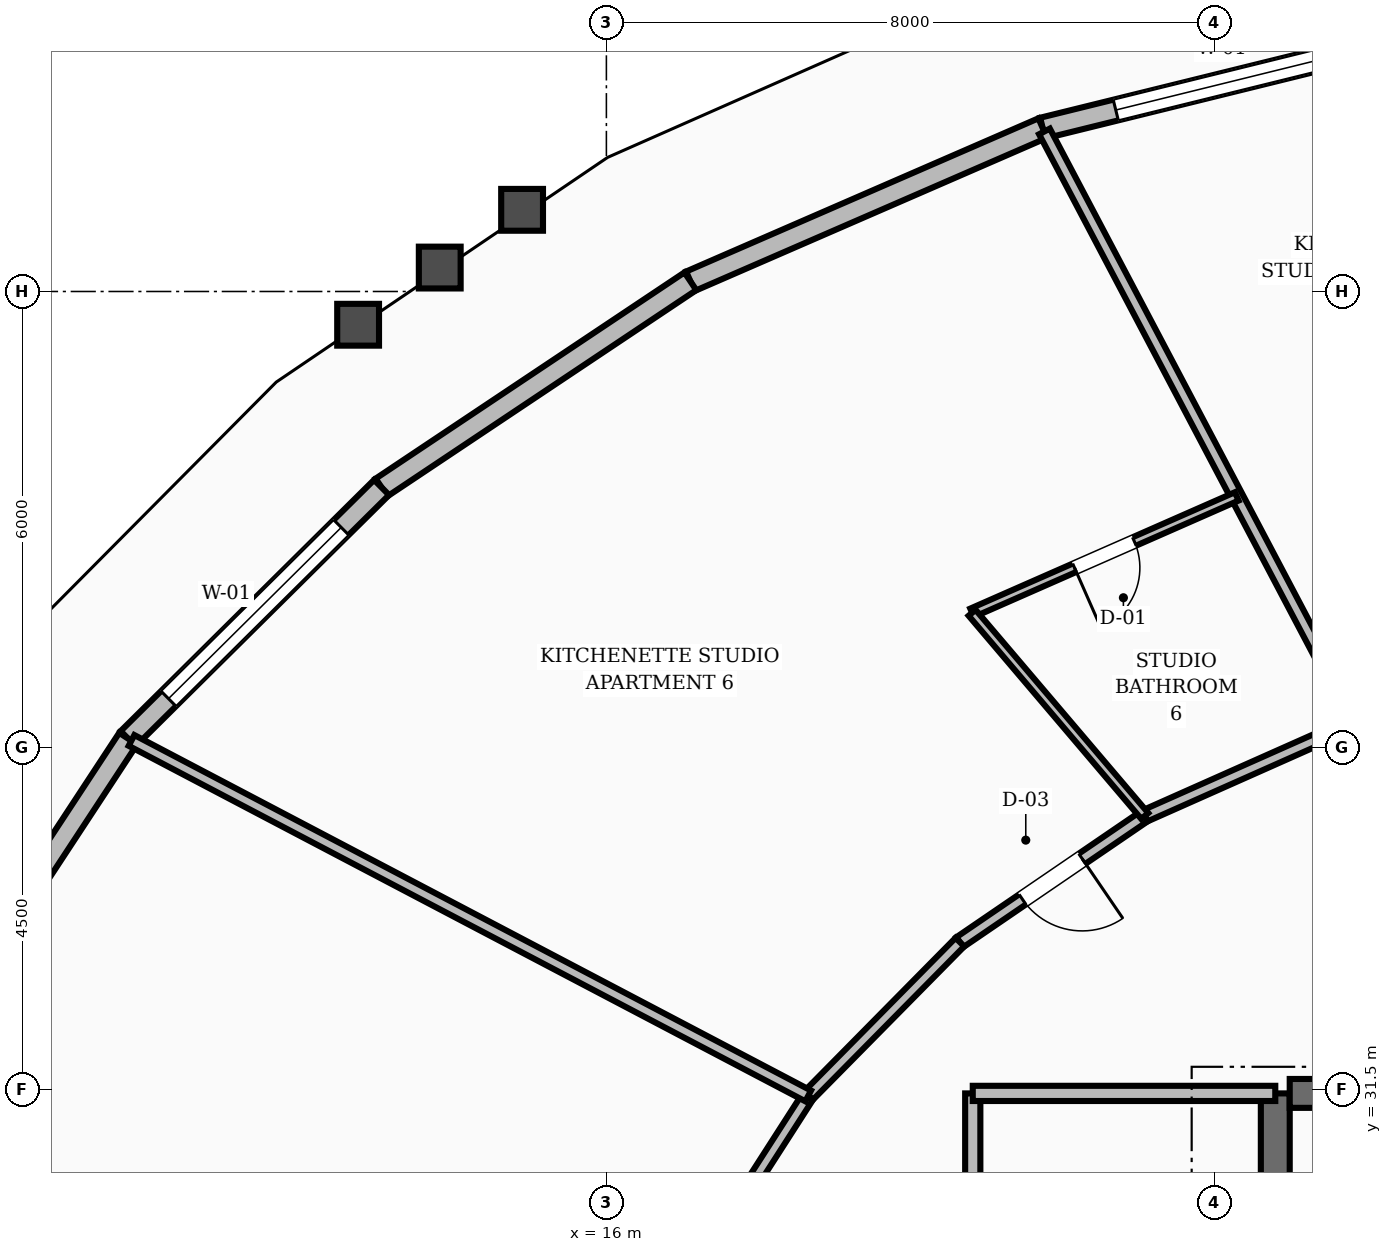
"""IFC4 building model, lengths in metres.
Left out: names, types, materials, properties, quantities, classifications, styles, units other than length and angle.
Written with IfcOpenShell. Run it as: python <this file> out.ifc"""

import sys

from ifc_helpers import new_model, si_unit, direction, frame, frame_2d, origin, place, context, subcontext, project, spatial, rectangle, extrude, element, fill, save


model = new_model("IFC4")
c1 = context("Model", 3, precision=1e-05, world=origin(), true_north=direction((0.0, 1.0)))
c2 = subcontext(c1, "Body", "Model", "MODEL_VIEW")
j1 = project(units=[si_unit("LENGTHUNIT", "METRE"), si_unit("PLANEANGLEUNIT", "RADIAN")], contexts=[c1])
p1 = place(None, origin())
s1 = spatial("IfcSite", under=j1, at=p1, CompositionType="ELEMENT")
p2 = place(p1, origin())
s2 = spatial("IfcBuilding", under=s1, at=p2, CompositionType="ELEMENT")
p3 = place(p2, frame((0.0, 0.0, 62.8)))
s3 = spatial("IfcBuildingStorey", under=s2, at=p3, CompositionType="ELEMENT", Elevation=62.8)
p4 = place(p3, frame((24.8, 25.15, 0.0), z_axis=(0.0, 0.0, 1.0), x_axis=(0.0, 1.0, 0.0)))
e1 = element("IfcWall", 1, at=p4, inside=s3, PredefinedType="SHEAR", context=c2, shape_type="SweptSolid", body=[
    extrude(rectangle(XDim=6.3, YDim=0.38, at=frame_2d((3.15, 0.0))), origin(), (0.0, 0.0, 1.0), 3.6),
])
p5 = place(p3, frame((24.99, 31.45, 0.0), z_axis=(0.0, 0.0, 1.0), x_axis=(1.0, 0.0, 0.0)))
e2 = element("IfcWall", 2, at=p5, inside=s3, PredefinedType="SHEAR", context=c2, shape_type="SweptSolid", body=[
    extrude(rectangle(XDim=3.21, YDim=0.38, at=frame_2d((1.605, 0.0))), origin(), (0.0, 0.0, 1.0), 3.6),
])
p6 = place(p3, frame((26.77, 45.391, 0.0), z_axis=(0.0, 0.0, 1.0), x_axis=(-0.970869978012, -0.239606940205, 0.0)))
e3 = element("IfcWall", 3, at=p6, inside=s3, PredefinedType="STANDARD", context=c2, shape_type="SweptSolid", body=[
    extrude(rectangle(XDim=5.18, YDim=0.28, at=frame_2d((2.59, 0.0))), origin(), (0.0, 0.0, 1.0), 2.71),
])
p7 = place(p6, frame((0.99, 0.0, 0.8)))
e4 = element("IfcOpeningElement", 4, at=p7, cuts=e3, PredefinedType="OPENING", context=c2, shape_type="SweptSolid", body=[
    extrude(rectangle(XDim=3.2, YDim=1.65, at=frame_2d((1.6, 0.825))), frame((0.0, 0.15, 0.0), z_axis=(0.0, -1.0, 0.0), x_axis=(1.0, 0.0, 0.0)), (0.0, 0.0, 1.0), 0.3),
])
p8 = place(p3, frame((21.74, 44.15, 0.0), z_axis=(0.0, 0.0, 1.0), x_axis=(-0.917066216605, -0.398734942488, 0.0)))
e5 = element("IfcWall", 5, at=p8, inside=s3, PredefinedType="STANDARD", context=c2, shape_type="SweptSolid", body=[
    extrude(rectangle(XDim=5.054, YDim=0.28, at=frame_2d((2.527, 0.0))), origin(), (0.0, 0.0, 1.0), 2.71),
])
p9 = place(p3, frame((17.105, 42.135, 0.0), z_axis=(0.0, 0.0, 1.0), x_axis=(-0.831665633672, -0.555276754213, 0.0)))
e6 = element("IfcWall", 6, at=p9, inside=s3, PredefinedType="STANDARD", context=c2, shape_type="SweptSolid", body=[
    extrude(rectangle(XDim=4.885, YDim=0.28, at=frame_2d((2.442, 0.0))), origin(), (0.0, 0.0, 1.0), 2.71),
])
p10 = place(p3, frame((13.042, 39.422, 0.0), z_axis=(0.0, 0.0, 1.0), x_axis=(-0.710194142887, -0.704005880238, 0.0)))
e7 = element("IfcWall", 7, at=p10, inside=s3, PredefinedType="STANDARD", context=c2, shape_type="SweptSolid", body=[
    extrude(rectangle(XDim=4.695, YDim=0.28, at=frame_2d((2.347, 0.0))), origin(), (0.0, 0.0, 1.0), 2.71),
])
p11 = place(p10, frame((0.747, 0.0, 0.8)))
e8 = element("IfcOpeningElement", 8, at=p11, cuts=e7, PredefinedType="OPENING", context=c2, shape_type="SweptSolid", body=[
    extrude(rectangle(XDim=3.2, YDim=1.65, at=frame_2d((1.6, 0.825))), frame((0.0, 0.15, 0.0), z_axis=(0.0, -1.0, 0.0), x_axis=(1.0, 0.0, 0.0)), (0.0, 0.0, 1.0), 0.3),
])
p12 = place(p3, frame((9.708, 36.117, 0.0), z_axis=(0.0, 0.0, 1.0), x_axis=(-0.54914333256, -0.835728185659, 0.0)))
e9 = element("IfcWall", 9, at=p12, inside=s3, PredefinedType="STANDARD", context=c2, shape_type="SweptSolid", body=[
    extrude(rectangle(XDim=4.512, YDim=0.28, at=frame_2d((2.256, 0.0))), origin(), (0.0, 0.0, 1.0), 2.71),
])
p13 = place(p3, frame((20.82, 28.32, 0.0), z_axis=(0.0, 0.0, 1.0), x_axis=(0.0, 1.0, 0.0)))
e10 = element("IfcWall", 10, at=p13, inside=s3, PredefinedType="SOLIDWALL", context=c2, shape_type="SweptSolid", body=[
    extrude(rectangle(XDim=3.13, YDim=0.2, at=frame_2d((1.565, 0.0))), origin(), (0.0, 0.0, 1.0), 2.71),
])
p14 = place(p13, frame((1.09, 0.0, 0.0)))
e11 = element("IfcOpeningElement", 11, at=p14, cuts=e10, PredefinedType="OPENING", context=c2, shape_type="SweptSolid", body=[
    extrude(rectangle(XDim=0.95, YDim=2.1, at=frame_2d((0.475, 1.05))), frame((0.0, 0.11, 0.0), z_axis=(0.0, -1.0, 0.0), x_axis=(1.0, 0.0, 0.0)), (0.0, 0.0, 1.0), 0.22),
])
p15 = place(p3, frame((20.82, 31.45, 0.0), z_axis=(0.0, 0.0, 1.0), x_axis=(1.0, 0.0, 0.0)))
e12 = element("IfcWall", 12, at=p15, inside=s3, PredefinedType="SOLIDWALL", context=c2, shape_type="SweptSolid", body=[
    extrude(rectangle(XDim=3.98, YDim=0.2, at=frame_2d((1.99, 0.0))), origin(), (0.0, 0.0, 1.0), 2.71),
])
p16 = place(p3, frame((25.858, 36.334, 0.0), z_axis=(0.0, 0.0, 1.0), x_axis=(-0.913768445178, -0.406235434936, 0.0)))
e13 = element("IfcWall", 13, at=p16, inside=s3, PredefinedType="SOLIDWALL", context=c2, shape_type="SweptSolid", body=[
    extrude(rectangle(XDim=3.037, YDim=0.16, at=frame_2d((1.519, 0.0))), origin(), (0.0, 0.0, 1.0), 2.71),
])
p17 = place(p3, frame((23.083, 35.1, 0.0), z_axis=(0.0, 0.0, 1.0), x_axis=(-0.825929039072, -0.563774088104, 0.0)))
e14 = element("IfcWall", 14, at=p17, inside=s3, PredefinedType="SOLIDWALL", context=c2, shape_type="SweptSolid", body=[
    extrude(rectangle(XDim=2.945, YDim=0.16, at=frame_2d((1.472, 0.0))), origin(), (0.0, 0.0, 1.0), 2.71),
])
p18 = place(p17, frame((0.997, 0.0, 0.0)))
e15 = element("IfcOpeningElement", 15, at=p18, cuts=e14, PredefinedType="OPENING", context=c2, shape_type="SweptSolid", body=[
    extrude(rectangle(XDim=0.95, YDim=2.1, at=frame_2d((0.475, 1.05))), frame((0.0, 0.09, 0.0), z_axis=(0.0, -1.0, 0.0), x_axis=(1.0, 0.0, 0.0)), (0.0, 0.0, 1.0), 0.18),
])
p19 = place(p3, frame((20.651, 33.44, 0.0), z_axis=(0.0, 0.0, 1.0), x_axis=(-0.702366174226, -0.711815816981, 0.0)))
e16 = element("IfcWall", 16, at=p19, inside=s3, PredefinedType="SOLIDWALL", context=c2, shape_type="SweptSolid", body=[
    extrude(rectangle(XDim=2.842, YDim=0.16, at=frame_2d((1.421, 0.0))), origin(), (0.0, 0.0, 1.0), 2.71),
])
p20 = place(p3, frame((18.655, 31.417, 0.0), z_axis=(0.0, 0.0, 1.0), x_axis=(-0.540595670038, -0.841282545603, 0.0)))
e17 = element("IfcWall", 17, at=p20, inside=s3, PredefinedType="SOLIDWALL", context=c2, shape_type="SweptSolid", body=[
    extrude(rectangle(XDim=2.744, YDim=0.16, at=frame_2d((1.372, 0.0))), origin(), (0.0, 0.0, 1.0), 2.71),
])
p21 = place(p3, frame((25.858, 36.334, 0.0), z_axis=(0.0, 0.0, 1.0), x_axis=(-0.466100337181, 0.884731866545, 0.0)))
e18 = element("IfcWall", 18, at=p21, inside=s3, PredefinedType="SOLIDWALL", context=c2, shape_type="SweptSolid", body=[
    extrude(rectangle(XDim=8.785, YDim=0.16, at=frame_2d((4.392, 0.0))), origin(), (0.0, 0.0, 1.0), 2.71),
])
p22 = place(p3, frame((24.293, 39.304, 0.0), z_axis=(0.0, 0.0, 1.0), x_axis=(-0.915429524068, -0.402478305582, 0.0)))
e19 = element("IfcWall", 19, at=p22, inside=s3, PredefinedType="PARTITIONING", context=c2, shape_type="SweptSolid", body=[
    extrude(rectangle(XDim=3.803, YDim=0.12, at=frame_2d((1.902, 0.0))), origin(), (0.0, 0.0, 1.0), 2.71),
])
p23 = place(p22, frame((1.472, 0.0, 0.0)))
e20 = element("IfcOpeningElement", 20, at=p23, cuts=e19, PredefinedType="OPENING", context=c2, shape_type="SweptSolid", body=[
    extrude(rectangle(XDim=0.86, YDim=2.1, at=frame_2d((0.43, 1.05))), frame((0.0, 0.07, 0.0), z_axis=(0.0, -1.0, 0.0), x_axis=(1.0, 0.0, 0.0)), (0.0, 0.0, 1.0), 0.14),
])
p24 = place(p3, frame((23.083, 35.1, 0.0), z_axis=(0.0, 0.0, 1.0), x_axis=(-0.647541339599, 0.762030323223, 0.0)))
e21 = element("IfcWall", 21, at=p24, inside=s3, PredefinedType="PARTITIONING", context=c2, shape_type="SweptSolid", body=[
    extrude(rectangle(XDim=3.508, YDim=0.12, at=frame_2d((1.754, 0.0))), origin(), (0.0, 0.0, 1.0), 2.71),
])
p25 = place(p3, frame((18.655, 31.417, 0.0), z_axis=(0.0, 0.0, 1.0), x_axis=(-0.885273971372, 0.465069882503, 0.0)))
e22 = element("IfcWall", 22, at=p25, inside=s3, PredefinedType="SOLIDWALL", context=c2, shape_type="SweptSolid", body=[
    extrude(rectangle(XDim=10.056, YDim=0.16, at=frame_2d((5.028, 0.0))), origin(), (0.0, 0.0, 1.0), 2.71),
])
p26 = place(p7, origin())
e23 = element("IfcWindow", 23, at=p26, inside=s3, PartitioningType="SINGLE_PANEL", PredefinedType="WINDOW", context=c2, shape_type="SweptSolid", body=[
    extrude(rectangle(XDim=3.2, YDim=1.65, at=frame_2d((1.6, 0.825))), frame((0.0, 0.03, 0.0), z_axis=(0.0, -1.0, 0.0), x_axis=(1.0, 0.0, 0.0)), (0.0, 0.0, 1.0), 0.06),
])
fill(e4, e23)
p27 = place(p11, origin())
e24 = element("IfcWindow", 24, at=p27, inside=s3, PartitioningType="SINGLE_PANEL", PredefinedType="WINDOW", context=c2, shape_type="SweptSolid", body=[
    extrude(rectangle(XDim=3.2, YDim=1.65, at=frame_2d((1.6, 0.825))), frame((0.0, 0.03, 0.0), z_axis=(0.0, -1.0, 0.0), x_axis=(1.0, 0.0, 0.0)), (0.0, 0.0, 1.0), 0.06),
])
fill(e8, e24)
p28 = place(p23, origin())
e25 = element("IfcDoor", 25, at=p28, inside=s3, OperationType="SINGLE_SWING_RIGHT", PredefinedType="DOOR", context=c2, shape_type="SweptSolid", body=[
    extrude(rectangle(XDim=0.86, YDim=2.1, at=frame_2d((0.43, 1.05))), frame((0.0, 0.025, 0.0), z_axis=(0.0, -1.0, 0.0), x_axis=(1.0, 0.0, 0.0)), (0.0, 0.0, 1.0), 0.05),
])
fill(e20, e25)
p29 = place(p18, origin())
e26 = element("IfcDoor", 26, at=p29, inside=s3, OperationType="SINGLE_SWING_LEFT", PredefinedType="DOOR", context=c2, shape_type="SweptSolid", body=[
    extrude(rectangle(XDim=0.95, YDim=2.1, at=frame_2d((0.475, 1.05))), frame((0.0, 0.025, 0.0), z_axis=(0.0, -1.0, 0.0), x_axis=(1.0, 0.0, 0.0)), (0.0, 0.0, 1.0), 0.05),
])
fill(e15, e26)
save(model, sys.argv[1])
